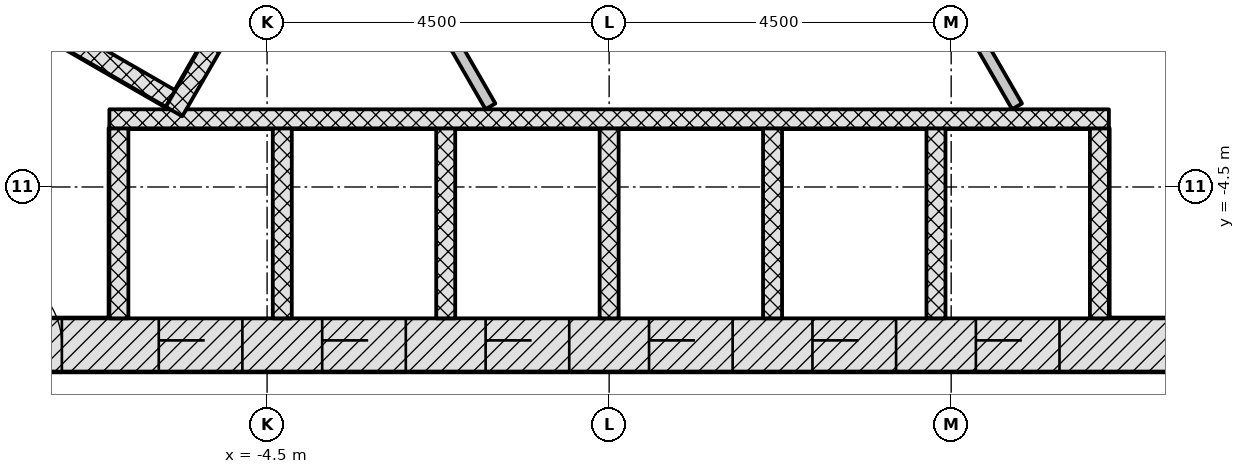
"""IFC4 building model, lengths in metres.
Left out: names, types, materials, properties, quantities, classifications, styles, units other than length and angle.
Written with IfcOpenShell. Run it as: python <this file> out.ifc"""

import sys

from ifc_helpers import new_model, si_unit, direction, frame, frame_2d, origin, place, context, subcontext, project, spatial, rectangle, extrude, element, fill, save


model = new_model("IFC4")
c1 = context("Model", 3, precision=1e-05, world=origin(), true_north=direction((0.0, 1.0)))
c2 = subcontext(c1, "Body", "Model", "MODEL_VIEW")
j1 = project(units=[si_unit("LENGTHUNIT", "METRE"), si_unit("PLANEANGLEUNIT", "RADIAN")], contexts=[c1])
p1 = place(None, origin())
s1 = spatial("IfcSite", under=j1, at=p1, CompositionType="ELEMENT")
p2 = place(p1, origin())
s2 = spatial("IfcBuilding", under=s1, at=p2, CompositionType="ELEMENT")
p3 = place(p2, frame((0.0, 0.0, 45.6)))
s3 = spatial("IfcBuildingStorey", under=s2, at=p3, CompositionType="ELEMENT", Elevation=45.6)
p4 = place(p3, frame((-9.229, -6.578, -0.2), z_axis=(0.0, 0.0, 1.0), x_axis=(1.0, 0.0, 0.0)))
e1 = element("IfcWall", 1, at=p4, inside=s3, PredefinedType="SHEAR", context=c2, shape_type="SweptSolid", body=[
    extrude(rectangle(XDim=18.458, YDim=0.7, at=frame_2d((9.229, 0.0))), origin(), (0.0, 0.0, 1.0), 3.6),
])
p5 = place(p4, frame((3.304, 0.0, 0.2)))
e2 = element("IfcOpeningElement", 2, at=p5, cuts=e1, PredefinedType="OPENING", context=c2, shape_type="SweptSolid", body=[
    extrude(rectangle(XDim=1.1, YDim=2.1, at=frame_2d((0.55, 1.05))), frame((0.0, 0.36, 0.0), z_axis=(0.0, -1.0, 0.0), x_axis=(1.0, 0.0, 0.0)), (0.0, 0.0, 1.0), 0.72),
])
p6 = place(p4, frame((5.454, 0.0, 0.2)))
e3 = element("IfcOpeningElement", 3, at=p6, cuts=e1, PredefinedType="OPENING", context=c2, shape_type="SweptSolid", body=[
    extrude(rectangle(XDim=1.1, YDim=2.1, at=frame_2d((0.55, 1.05))), frame((0.0, 0.36, 0.0), z_axis=(0.0, -1.0, 0.0), x_axis=(1.0, 0.0, 0.0)), (0.0, 0.0, 1.0), 0.72),
])
p7 = place(p4, frame((7.604, 0.0, 0.2)))
e4 = element("IfcOpeningElement", 4, at=p7, cuts=e1, PredefinedType="OPENING", context=c2, shape_type="SweptSolid", body=[
    extrude(rectangle(XDim=1.1, YDim=2.1, at=frame_2d((0.55, 1.05))), frame((0.0, 0.36, 0.0), z_axis=(0.0, -1.0, 0.0), x_axis=(1.0, 0.0, 0.0)), (0.0, 0.0, 1.0), 0.72),
])
p8 = place(p4, frame((9.754, 0.0, 0.2)))
e5 = element("IfcOpeningElement", 5, at=p8, cuts=e1, PredefinedType="OPENING", context=c2, shape_type="SweptSolid", body=[
    extrude(rectangle(XDim=1.1, YDim=2.1, at=frame_2d((0.55, 1.05))), frame((0.0, 0.36, 0.0), z_axis=(0.0, -1.0, 0.0), x_axis=(1.0, 0.0, 0.0)), (0.0, 0.0, 1.0), 0.72),
])
p9 = place(p4, frame((11.904, 0.0, 0.2)))
e6 = element("IfcOpeningElement", 6, at=p9, cuts=e1, PredefinedType="OPENING", context=c2, shape_type="SweptSolid", body=[
    extrude(rectangle(XDim=1.1, YDim=2.1, at=frame_2d((0.55, 1.05))), frame((0.0, 0.36, 0.0), z_axis=(0.0, -1.0, 0.0), x_axis=(1.0, 0.0, 0.0)), (0.0, 0.0, 1.0), 0.72),
])
p10 = place(p4, frame((14.054, 0.0, 0.2)))
e7 = element("IfcOpeningElement", 7, at=p10, cuts=e1, PredefinedType="OPENING", context=c2, shape_type="SweptSolid", body=[
    extrude(rectangle(XDim=1.1, YDim=2.1, at=frame_2d((0.55, 1.05))), frame((0.0, 0.36, 0.0), z_axis=(0.0, -1.0, 0.0), x_axis=(1.0, 0.0, 0.0)), (0.0, 0.0, 1.0), 0.72),
])
p11 = place(p4, frame((1.029, 0.0, 0.2)))
e8 = element("IfcOpeningElement", 8, at=p11, cuts=e1, PredefinedType="OPENING", context=c2, shape_type="SweptSolid", body=[
    extrude(rectangle(XDim=1.0, YDim=2.1, at=frame_2d((0.5, 1.05))), frame((0.0, 0.36, 0.0), z_axis=(0.0, -1.0, 0.0), x_axis=(1.0, 0.0, 0.0)), (0.0, 0.0, 1.0), 0.72),
])
p12 = place(p3, frame((10.311, -4.703, -0.2), z_axis=(0.0, 0.0, 1.0), x_axis=(-0.500001446645, 0.866024568562, 0.0)))
e9 = element("IfcWall", 9, at=p12, inside=s3, PredefinedType="SHEAR", context=c2, shape_type="SweptSolid", body=[
    extrude(rectangle(XDim=18.458, YDim=0.7, at=frame_2d((9.229, 0.0))), origin(), (0.0, 0.0, 1.0), 3.6),
])
p13 = place(p12, frame((10.5, 0.0, 0.2)))
e10 = element("IfcOpeningElement", 10, at=p13, cuts=e9, PredefinedType="OPENING", context=c2, shape_type="SweptSolid", body=[
    extrude(rectangle(XDim=1.0, YDim=2.1, at=frame_2d((0.5, 1.05))), frame((0.0, 0.36, 0.0), z_axis=(0.0, -1.0, 0.0), x_axis=(1.0, 0.0, 0.0)), (0.0, 0.0, 1.0), 0.72),
])
p14 = place(p12, frame((4.877, 0.0, 0.2)))
e11 = element("IfcOpeningElement", 11, at=p14, cuts=e9, PredefinedType="OPENING", context=c2, shape_type="SweptSolid", body=[
    extrude(rectangle(XDim=0.9, YDim=2.1, at=frame_2d((0.45, 1.05))), frame((0.0, 0.36, 0.0), z_axis=(0.0, -1.0, 0.0), x_axis=(1.0, 0.0, 0.0)), (0.0, 0.0, 1.0), 0.72),
])
p15 = place(p12, frame((14.452, 0.0, 0.2)))
e12 = element("IfcOpeningElement", 12, at=p15, cuts=e9, PredefinedType="OPENING", context=c2, shape_type="SweptSolid", body=[
    extrude(rectangle(XDim=0.9, YDim=2.1, at=frame_2d((0.45, 1.05))), frame((0.0, 0.36, 0.0), z_axis=(0.0, -1.0, 0.0), x_axis=(1.0, 0.0, 0.0)), (0.0, 0.0, 1.0), 0.72),
])
p16 = place(p3, frame((-1.083, 11.281, -0.2), z_axis=(0.0, 0.0, 1.0), x_axis=(-0.500001446645, -0.866024568562, 0.0)))
e13 = element("IfcWall", 13, at=p16, inside=s3, PredefinedType="SHEAR", context=c2, shape_type="SweptSolid", body=[
    extrude(rectangle(XDim=18.458, YDim=0.7, at=frame_2d((9.229, 0.0))), origin(), (0.0, 0.0, 1.0), 3.6),
])
p17 = place(p16, frame((8.979, 0.0, 0.2)))
e14 = element("IfcOpeningElement", 14, at=p17, cuts=e13, PredefinedType="OPENING", context=c2, shape_type="SweptSolid", body=[
    extrude(rectangle(XDim=1.2, YDim=2.1, at=frame_2d((0.6, 1.05))), frame((0.0, 0.36, 0.0), z_axis=(0.0, -1.0, 0.0), x_axis=(1.0, 0.0, 0.0)), (0.0, 0.0, 1.0), 0.72),
])
p18 = place(p16, frame((11.029, 0.0, 0.2)))
e15 = element("IfcOpeningElement", 15, at=p18, cuts=e13, PredefinedType="OPENING", context=c2, shape_type="SweptSolid", body=[
    extrude(rectangle(XDim=1.2, YDim=2.1, at=frame_2d((0.6, 1.05))), frame((0.0, 0.36, 0.0), z_axis=(0.0, -1.0, 0.0), x_axis=(1.0, 0.0, 0.0)), (0.0, 0.0, 1.0), 0.72),
])
for number, where, z_axis, x_axis in (
    (16, (-6.45, -6.228, -0.2), (0.0, 0.0, 1.0), (0.0, 1.0, 0.0)),
    (17, (-4.3, -6.228, -0.2), (0.0, 0.0, 1.0), (0.0, 1.0, 0.0)),
    (18, (-2.15, -6.228, -0.2), (0.0, 0.0, 1.0), (0.0, 1.0, 0.0)),
    (19, (0.0, -6.228, -0.2), (0.0, 0.0, 1.0), (0.0, 1.0, 0.0)),
    (20, (2.15, -6.228, -0.2), (0.0, 0.0, 1.0), (0.0, 1.0, 0.0)),
    (21, (4.3, -6.228, -0.2), (0.0, 0.0, 1.0), (0.0, 1.0, 0.0)),
    (22, (6.45, -6.228, -0.2), (0.0, 0.0, 1.0), (0.0, 1.0, 0.0)),
):
    element("IfcWall", number, at=place(p3, frame(where, z_axis=z_axis, x_axis=x_axis)), inside=s3, PredefinedType="PARTITIONING", context=c2, shape_type="SweptSolid", body=[
        extrude(rectangle(XDim=2.5, YDim=0.25, at=frame_2d((1.25, 0.0))), origin(), (0.0, 0.0, 1.0), 3.6),
    ])
p19 = place(p3, frame((-6.575, -3.603, 0.0), z_axis=(0.0, 0.0, 1.0), x_axis=(1.0, 0.0, 0.0)))
e23 = element("IfcWall", 23, at=p19, inside=s3, PredefinedType="PARTITIONING", context=c2, shape_type="SweptSolid", body=[
    extrude(rectangle(XDim=13.15, YDim=0.25, at=frame_2d((6.575, 0.0))), origin(), (0.0, 0.0, 1.0), 3.4),
])
p20 = place(p3, frame((-8.281, -1.887, -0.2), z_axis=(0.0, 0.0, 1.0), x_axis=(0.866032775405, -0.499987231761, 0.0)))
e24 = element("IfcWall", 24, at=p20, inside=s3, PredefinedType="PARTITIONING", context=c2, shape_type="SweptSolid", body=[
    extrude(rectangle(XDim=2.9, YDim=0.25, at=frame_2d((1.45, 0.0))), origin(), (0.0, 0.0, 1.0), 3.6),
])
p21 = place(p3, frame((0.176, 6.711, 0.0), z_axis=(0.0, 0.0, 1.0), x_axis=(-0.500004227369, -0.866022963098, 0.0)))
e25 = element("IfcWall", 25, at=p21, inside=s3, PredefinedType="PARTITIONING", context=c2, shape_type="SweptSolid", body=[
    extrude(rectangle(XDim=11.8, YDim=0.25, at=frame_2d((5.9, 0.0))), origin(), (0.0, 0.0, 1.0), 3.4),
])
p22 = place(p3, frame((5.367, -3.439, 0.0), z_axis=(0.0, 0.0, 1.0), x_axis=(-0.499981499682, 0.866036084685, 0.0)))
e26 = element("IfcWall", 26, at=p22, inside=s3, PredefinedType="PARTITIONING", context=c2, shape_type="SweptSolid", body=[
    extrude(rectangle(XDim=6.608, YDim=0.15, at=frame_2d((3.304, 0.0))), origin(), (0.0, 0.0, 1.0), 3.4),
])
p23 = place(p3, frame((-1.561, -3.439, 0.0), z_axis=(0.0, 0.0, 1.0), x_axis=(-0.499989077369, 0.866031709877, 0.0)))
e27 = element("IfcWall", 27, at=p23, inside=s3, PredefinedType="PARTITIONING", context=c2, shape_type="SweptSolid", body=[
    extrude(rectangle(XDim=3.144, YDim=0.15, at=frame_2d((1.572, 0.0))), origin(), (0.0, 0.0, 1.0), 3.4),
])
p24 = place(p3, frame((-16.256, -3.149, 0.0), z_axis=(0.0, 0.0, 1.0), x_axis=(0.499999683919, 0.866025586274, 0.0)))
e28 = element("IfcWall", 28, at=p24, inside=s3, PredefinedType="PARTITIONING", context=c2, shape_type="SweptSolid", body=[
    extrude(rectangle(XDim=22.234, YDim=0.15, at=frame_2d((11.117, 0.0))), origin(), (0.0, 0.0, 1.0), 2.778),
])
p25 = place(p24, frame((17.842, 0.0, 0.0)))
e29 = element("IfcOpeningElement", 29, at=p25, cuts=e28, PredefinedType="OPENING", context=c2, shape_type="SweptSolid", body=[
    extrude(rectangle(XDim=1.0, YDim=2.1, at=frame_2d((0.5, 1.05))), frame((0.0, 0.085, 0.0), z_axis=(0.0, -1.0, 0.0), x_axis=(1.0, 0.0, 0.0)), (0.0, 0.0, 1.0), 0.17),
])
p26 = place(p24, frame((15.26, 0.0, 0.0)))
e30 = element("IfcOpeningElement", 30, at=p26, cuts=e28, PredefinedType="OPENING", context=c2, shape_type="SweptSolid", body=[
    extrude(rectangle(XDim=1.0, YDim=2.1, at=frame_2d((0.5, 1.05))), frame((0.0, 0.085, 0.0), z_axis=(0.0, -1.0, 0.0), x_axis=(1.0, 0.0, 0.0)), (0.0, 0.0, 1.0), 0.17),
])
p27 = place(p24, frame((11.92, 0.0, 0.0)))
e31 = element("IfcOpeningElement", 31, at=p27, cuts=e28, PredefinedType="OPENING", context=c2, shape_type="SweptSolid", body=[
    extrude(rectangle(XDim=1.5, YDim=2.1, at=frame_2d((0.75, 1.05))), frame((0.0, 0.085, 0.0), z_axis=(0.0, -1.0, 0.0), x_axis=(1.0, 0.0, 0.0)), (0.0, 0.0, 1.0), 0.17),
])
p28 = place(p24, frame((4.547, 0.0, 0.0)))
e32 = element("IfcOpeningElement", 32, at=p28, cuts=e28, PredefinedType="OPENING", context=c2, shape_type="SweptSolid", body=[
    extrude(rectangle(XDim=1.5, YDim=2.1, at=frame_2d((0.75, 1.05))), frame((0.0, 0.085, 0.0), z_axis=(0.0, -1.0, 0.0), x_axis=(1.0, 0.0, 0.0)), (0.0, 0.0, 1.0), 0.17),
])
p29 = place(p3, frame((5.346, 8.446, 0.0), z_axis=(0.0, 0.0, 1.0), x_axis=(0.500008781656, -0.866020333634, 0.0)))
e33 = element("IfcWall", 33, at=p29, inside=s3, PredefinedType="PARTITIONING", context=c2, shape_type="SweptSolid", body=[
    extrude(rectangle(XDim=15.057, YDim=0.15, at=frame_2d((7.528, 0.0))), origin(), (0.0, 0.0, 1.0), 2.778),
])
p30 = place(p29, frame((9.446, 0.0, 0.0)))
e34 = element("IfcOpeningElement", 34, at=p30, cuts=e33, PredefinedType="OPENING", context=c2, shape_type="SweptSolid", body=[
    extrude(rectangle(XDim=1.0, YDim=2.1, at=frame_2d((0.5, 1.05))), frame((0.0, 0.085, 0.0), z_axis=(0.0, -1.0, 0.0), x_axis=(1.0, 0.0, 0.0)), (0.0, 0.0, 1.0), 0.17),
])
p31 = place(p29, frame((1.892, 0.0, 0.0)))
e35 = element("IfcOpeningElement", 35, at=p31, cuts=e33, PredefinedType="OPENING", context=c2, shape_type="SweptSolid", body=[
    extrude(rectangle(XDim=1.0, YDim=2.1, at=frame_2d((0.5, 1.05))), frame((0.0, 0.085, 0.0), z_axis=(0.0, -1.0, 0.0), x_axis=(1.0, 0.0, 0.0)), (0.0, 0.0, 1.0), 0.17),
])
p32 = place(p5, origin())
e36 = element("IfcDoor", 36, at=p32, inside=s3, OperationType="DOUBLE_DOOR_SLIDING", PredefinedType="DOOR", context=c2, shape_type="SweptSolid", body=[
    extrude(rectangle(XDim=1.1, YDim=2.1, at=frame_2d((0.55, 1.05))), frame((0.0, 0.025, 0.0), z_axis=(0.0, -1.0, 0.0), x_axis=(1.0, 0.0, 0.0)), (0.0, 0.0, 1.0), 0.05),
])
fill(e2, e36)
p33 = place(p6, origin())
e37 = element("IfcDoor", 37, at=p33, inside=s3, OperationType="DOUBLE_DOOR_SLIDING", PredefinedType="DOOR", context=c2, shape_type="SweptSolid", body=[
    extrude(rectangle(XDim=1.1, YDim=2.1, at=frame_2d((0.55, 1.05))), frame((0.0, 0.025, 0.0), z_axis=(0.0, -1.0, 0.0), x_axis=(1.0, 0.0, 0.0)), (0.0, 0.0, 1.0), 0.05),
])
fill(e3, e37)
p34 = place(p7, origin())
e38 = element("IfcDoor", 38, at=p34, inside=s3, OperationType="DOUBLE_DOOR_SLIDING", PredefinedType="DOOR", context=c2, shape_type="SweptSolid", body=[
    extrude(rectangle(XDim=1.1, YDim=2.1, at=frame_2d((0.55, 1.05))), frame((0.0, 0.025, 0.0), z_axis=(0.0, -1.0, 0.0), x_axis=(1.0, 0.0, 0.0)), (0.0, 0.0, 1.0), 0.05),
])
fill(e4, e38)
p35 = place(p8, origin())
e39 = element("IfcDoor", 39, at=p35, inside=s3, OperationType="DOUBLE_DOOR_SLIDING", PredefinedType="DOOR", context=c2, shape_type="SweptSolid", body=[
    extrude(rectangle(XDim=1.1, YDim=2.1, at=frame_2d((0.55, 1.05))), frame((0.0, 0.025, 0.0), z_axis=(0.0, -1.0, 0.0), x_axis=(1.0, 0.0, 0.0)), (0.0, 0.0, 1.0), 0.05),
])
fill(e5, e39)
p36 = place(p9, origin())
e40 = element("IfcDoor", 40, at=p36, inside=s3, OperationType="DOUBLE_DOOR_SLIDING", PredefinedType="DOOR", context=c2, shape_type="SweptSolid", body=[
    extrude(rectangle(XDim=1.1, YDim=2.1, at=frame_2d((0.55, 1.05))), frame((0.0, 0.025, 0.0), z_axis=(0.0, -1.0, 0.0), x_axis=(1.0, 0.0, 0.0)), (0.0, 0.0, 1.0), 0.05),
])
fill(e6, e40)
p37 = place(p10, origin())
e41 = element("IfcDoor", 41, at=p37, inside=s3, OperationType="DOUBLE_DOOR_SLIDING", PredefinedType="DOOR", context=c2, shape_type="SweptSolid", body=[
    extrude(rectangle(XDim=1.1, YDim=2.1, at=frame_2d((0.55, 1.05))), frame((0.0, 0.025, 0.0), z_axis=(0.0, -1.0, 0.0), x_axis=(1.0, 0.0, 0.0)), (0.0, 0.0, 1.0), 0.05),
])
fill(e7, e41)
p38 = place(p11, origin())
e42 = element("IfcDoor", 42, at=p38, inside=s3, OperationType="SINGLE_SWING_LEFT", PredefinedType="DOOR", context=c2, shape_type="SweptSolid", body=[
    extrude(rectangle(XDim=1.0, YDim=2.1, at=frame_2d((0.5, 1.05))), frame((0.0, 0.075, 0.0), z_axis=(0.0, -1.0, 0.0), x_axis=(1.0, 0.0, 0.0)), (0.0, 0.0, 1.0), 0.15),
])
fill(e8, e42)
save(model, sys.argv[1])
